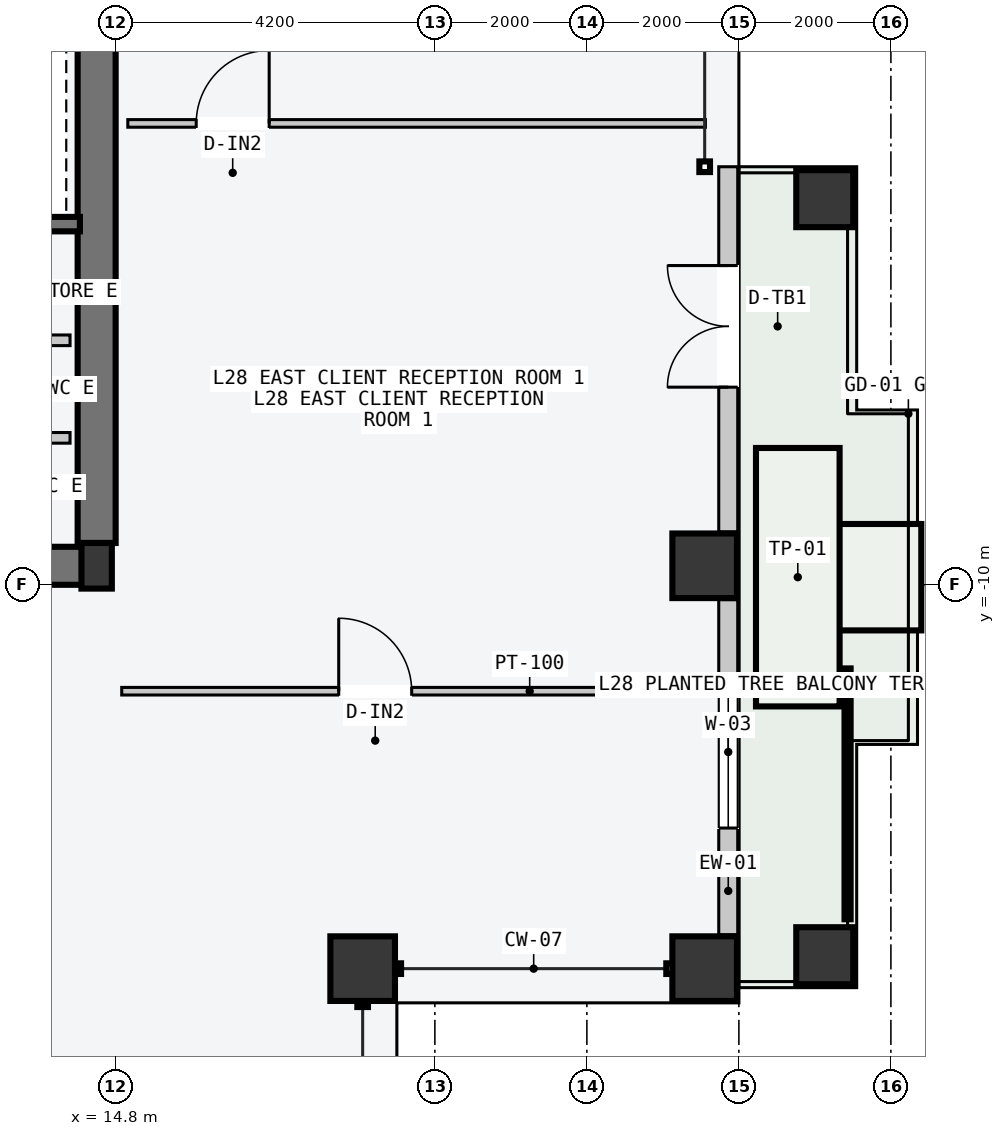
"""IFC4 building model, lengths in metres.
Left out: names, types, materials, properties, quantities, classifications, styles, units other than length and angle.
Written with IfcOpenShell. Run it as: python <this file> out.ifc"""

import sys

from ifc_helpers import new_model, si_unit, direction, frame, frame_2d, origin, origin_2d, place, context, subcontext, project, spatial, rectangle, hollow_rectangle, i_section, extrude, element, fill, save


model = new_model("IFC4")
c1 = context("Model", 3, precision=1e-05, world=origin(), true_north=direction((0.0, 1.0)))
c2 = subcontext(c1, "Body", "Model", "MODEL_VIEW")
j1 = project(units=[si_unit("LENGTHUNIT", "METRE"), si_unit("PLANEANGLEUNIT", "RADIAN")], contexts=[c1])
p1 = place(None, origin())
s1 = spatial("IfcSite", under=j1, at=p1, CompositionType="ELEMENT")
p2 = place(p1, origin())
s2 = spatial("IfcBuilding", under=s1, at=p2, CompositionType="ELEMENT")
p3 = place(p2, frame((0.0, 0.0, 109.8)))
s3 = spatial("IfcBuildingStorey", under=s2, at=p3, CompositionType="ELEMENT", Elevation=109.8)
p4 = place(p3, frame((8.07, -9.75, -0.2), z_axis=(0.0, 0.0, 1.0), x_axis=(1.0, 0.0, 0.0)))
e1 = element("IfcWall", 1, at=p4, inside=s3, PredefinedType="SHEAR", context=c2, shape_type="SweptSolid", body=[
    extrude(rectangle(XDim=6.46, YDim=0.5, at=frame_2d((3.23, 0.0))), origin(), (0.0, 0.0, 1.0), 3.6),
])
p5 = place(p3, frame((14.55, -9.45, -0.2), z_axis=(0.0, 0.0, 1.0), x_axis=(0.0, 1.0, 0.0)))
e2 = element("IfcWall", 2, at=p5, inside=s3, PredefinedType="SHEAR", context=c2, shape_type="SweptSolid", body=[
    extrude(rectangle(XDim=9.15, YDim=0.5, at=frame_2d((4.575, 0.0))), origin(), (0.0, 0.0, 1.0), 3.6),
])
p6 = place(p3, frame((14.55, -9.75, 0.0), z_axis=(0.0, 0.0, 1.0), x_axis=(1.0, 0.0, 0.0)))
e3 = element("IfcColumn", 3, at=p6, inside=s3, PredefinedType="COLUMN", context=c2, shape_type="SweptSolid", body=[
    extrude(i_section(OverallWidth=0.4, OverallDepth=0.6, WebThickness=0.022, FlangeThickness=0.036, at=origin_2d()), origin(), (0.0, 0.0, 1.0), 3.6),
])
for number, where, z_axis, x_axis in (
    (4, (22.55, -15.05, 0.0), (0.0, 0.0, 1.0), (0.0, 1.0, 0.0)),
    (5, (22.55, -9.75, 0.0), (0.0, 0.0, 1.0), (0.0, 1.0, 0.0)),
    (6, (18.05, -15.05, 0.0), (0.0, 0.0, 1.0), (1.0, 0.0, 0.0)),
):
    element("IfcColumn", number, at=place(p3, frame(where, z_axis=z_axis, x_axis=x_axis)), inside=s3, PredefinedType="COLUMN", context=c2, shape_type="SweptSolid", body=[
        extrude(hollow_rectangle(XDim=0.85, YDim=0.85, WallThickness=0.04, at=origin_2d()), origin(), (0.0, 0.0, 1.0), 3.6),
    ])
for number, where, z_axis, x_axis in (
    (7, (24.13, -14.88, 0.0), (0.0, 0.0, 1.0), (0.0, 1.0, 0.0)),
    (8, (24.13, -4.92, 0.0), (0.0, 0.0, 1.0), (0.0, 1.0, 0.0)),
):
    element("IfcColumn", number, at=place(p3, frame(where, z_axis=z_axis, x_axis=x_axis)), inside=s3, PredefinedType="COLUMN", context=c2, shape_type="SweptSolid", body=[
        extrude(hollow_rectangle(XDim=0.75, YDim=0.75, WallThickness=0.032, at=origin_2d()), origin(), (0.0, 0.0, 1.0), 3.6),
    ])
p7 = place(p3, frame((22.86, -14.605, 0.0), z_axis=(0.0, 0.0, 1.0), x_axis=(0.0, 1.0, 0.0)))
e9 = element("IfcWall", 9, at=p7, inside=s3, PredefinedType="STANDARD", context=c2, shape_type="SweptSolid", body=[
    extrude(rectangle(XDim=4.41, YDim=0.25, at=frame_2d((2.205, 0.0))), origin(), (0.0, 0.0, 1.0), 3.4),
])
p8 = place(p7, frame((1.405, 0.0, 0.85)))
e10 = element("IfcOpeningElement", 10, at=p8, cuts=e9, PredefinedType="OPENING", context=c2, shape_type="SweptSolid", body=[
    extrude(rectangle(XDim=2.0, YDim=2.1, at=frame_2d((1.0, 1.05))), frame((0.0, 0.135, 0.0), z_axis=(0.0, -1.0, 0.0), x_axis=(1.0, 0.0, 0.0)), (0.0, 0.0, 1.0), 0.27),
])
p9 = place(p3, frame((22.86, -9.305, 0.0), z_axis=(0.0, 0.0, 1.0), x_axis=(0.0, 1.0, 0.0)))
e11 = element("IfcWall", 11, at=p9, inside=s3, PredefinedType="STANDARD", context=c2, shape_type="SweptSolid", body=[
    extrude(rectangle(XDim=4.805, YDim=0.25, at=frame_2d((2.402, 0.0))), origin(), (0.0, 0.0, 1.0), 3.4),
])
p10 = place(p9, frame((1.905, 0.0, 0.0)))
e12 = element("IfcOpeningElement", 12, at=p10, cuts=e11, PredefinedType="OPENING", context=c2, shape_type="SweptSolid", body=[
    extrude(rectangle(XDim=1.6, YDim=2.2, at=frame_2d((0.8, 1.1))), frame((0.0, 0.135, 0.0), z_axis=(0.0, -1.0, 0.0), x_axis=(1.0, 0.0, 0.0)), (0.0, 0.0, 1.0), 0.27),
])
p11 = place(p3, frame((11.65, -5.255, -0.2), z_axis=(0.0, 0.0, 1.0), x_axis=(1.0, 0.0, 0.0)))
e13 = element("IfcWall", 13, at=p11, inside=s3, PredefinedType="SOLIDWALL", context=c2, shape_type="SweptSolid", body=[
    extrude(rectangle(XDim=2.68, YDim=0.19, at=frame_2d((1.34, 0.0))), origin(), (0.0, 0.0, 1.0), 3.6),
])
for number, where, z_axis, x_axis in (
    (14, (11.7, -8.067, 0.0), (0.0, 0.0, 1.0), (1.0, 0.0, 0.0)),
    (15, (11.7, -6.783, 0.0), (0.0, 0.0, 1.0), (1.0, 0.0, 0.0)),
):
    element("IfcWall", number, at=place(p3, frame(where, z_axis=z_axis, x_axis=x_axis)), inside=s3, PredefinedType="PARTITIONING", context=c2, shape_type="SweptSolid", body=[
        extrude(rectangle(XDim=2.5, YDim=0.14, at=frame_2d((1.25, 0.0))), origin(), (0.0, 0.0, 1.0), 3.4),
    ])
p12 = place(p3, frame((14.88, -11.4, 0.0), z_axis=(0.0, 0.0, 1.0), x_axis=(1.0, 0.0, 0.0)))
e16 = element("IfcWall", 16, at=p12, inside=s3, PredefinedType="PARTITIONING", context=c2, shape_type="SweptSolid", body=[
    extrude(rectangle(XDim=6.67, YDim=0.1, at=frame_2d((3.335, 0.0))), origin(), (0.0, 0.0, 1.0), 3.4),
])
p13 = place(p12, frame((2.855, 0.0, 0.0)))
e17 = element("IfcOpeningElement", 17, at=p13, cuts=e16, PredefinedType="OPENING", context=c2, shape_type="SweptSolid", body=[
    extrude(rectangle(XDim=0.96, YDim=2.18, at=frame_2d((0.48, 1.09))), frame((0.0, 0.06, 0.0), z_axis=(0.0, -1.0, 0.0), x_axis=(1.0, 0.0, 0.0)), (0.0, 0.0, 1.0), 0.12),
])
p14 = place(p3, frame((14.96, -3.93, 0.0), z_axis=(0.0, 0.0, 1.0), x_axis=(1.0, 0.0, 0.0)))
e18 = element("IfcWall", 18, at=p14, inside=s3, PredefinedType="PARTITIONING", context=c2, shape_type="SweptSolid", body=[
    extrude(rectangle(XDim=7.6, YDim=0.1, at=frame_2d((3.8, 0.0))), origin(), (0.0, 0.0, 1.0), 3.4),
])
p15 = place(p14, frame((0.9, 0.0, 0.0)))
e19 = element("IfcOpeningElement", 19, at=p15, cuts=e18, PredefinedType="OPENING", context=c2, shape_type="SweptSolid", body=[
    extrude(rectangle(XDim=0.96, YDim=2.18, at=frame_2d((0.48, 1.09))), frame((0.0, 0.06, 0.0), z_axis=(0.0, -1.0, 0.0), x_axis=(1.0, 0.0, 0.0)), (0.0, 0.0, 1.0), 0.12),
])
p16 = place(p8, origin())
e20 = element("IfcWindow", 20, at=p16, inside=s3, PartitioningType="SINGLE_PANEL", PredefinedType="WINDOW", context=c2, shape_type="SweptSolid", body=[
    extrude(rectangle(XDim=2.0, YDim=2.1, at=frame_2d((1.0, 1.05))), frame((0.0, 0.03, 0.0), z_axis=(0.0, -1.0, 0.0), x_axis=(1.0, 0.0, 0.0)), (0.0, 0.0, 1.0), 0.06),
])
fill(e10, e20)
p17 = place(p10, origin())
e21 = element("IfcDoor", 21, at=p17, inside=s3, OperationType="DOUBLE_DOOR_SINGLE_SWING", PredefinedType="DOOR", context=c2, shape_type="SweptSolid", body=[
    extrude(rectangle(XDim=1.6, YDim=2.2, at=frame_2d((0.8, 1.1))), frame((0.0, 0.025, 0.0), z_axis=(0.0, -1.0, 0.0), x_axis=(1.0, 0.0, 0.0)), (0.0, 0.0, 1.0), 0.05),
])
fill(e12, e21)
p18 = place(p13, origin())
e22 = element("IfcDoor", 22, at=p18, inside=s3, OperationType="SINGLE_SWING_LEFT", PredefinedType="DOOR", context=c2, shape_type="SweptSolid", body=[
    extrude(rectangle(XDim=0.96, YDim=2.18, at=frame_2d((0.48, 1.09))), frame((0.0, 0.025, 0.0), z_axis=(0.0, -1.0, 0.0), x_axis=(1.0, 0.0, 0.0)), (0.0, 0.0, 1.0), 0.05),
])
fill(e17, e22)
p19 = place(p15, origin())
e23 = element("IfcDoor", 23, at=p19, inside=s3, OperationType="SINGLE_SWING_RIGHT", PredefinedType="DOOR", context=c2, shape_type="SweptSolid", body=[
    extrude(rectangle(XDim=0.96, YDim=2.18, at=frame_2d((0.48, 1.09))), frame((0.0, 0.025, 0.0), z_axis=(0.0, -1.0, 0.0), x_axis=(1.0, 0.0, 0.0)), (0.0, 0.0, 1.0), 0.05),
])
fill(e19, e23)
save(model, sys.argv[1])
